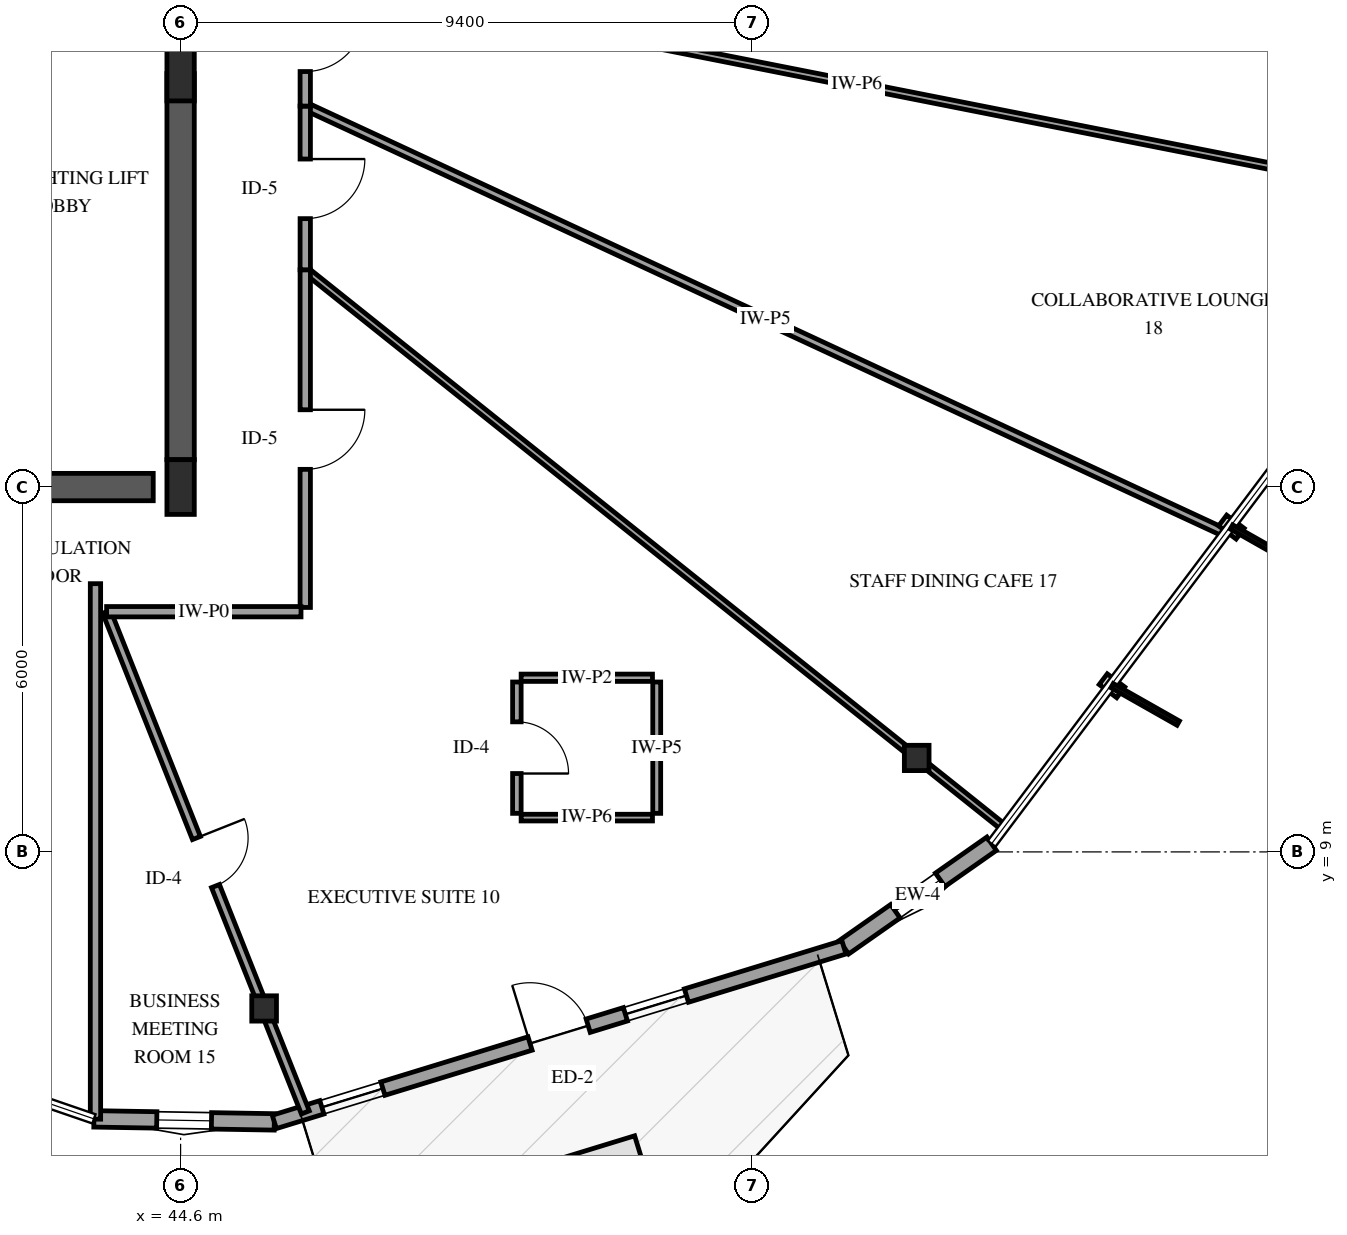
"""IFC4 building model, lengths in metres.
Left out: names, types, materials, properties, quantities, classifications, styles, units other than length and angle.
Written with IfcOpenShell. Run it as: python <this file> out.ifc"""

import sys

from ifc_helpers import new_model, si_unit, direction, frame, frame_2d, origin, origin_2d, place, context, subcontext, project, spatial, rectangle, i_section, extrude, element, fill, save


model = new_model("IFC4")
c1 = context("Model", 3, precision=1e-05, world=origin(), true_north=direction((0.0, 1.0)))
c2 = subcontext(c1, "Body", "Model", "MODEL_VIEW")
j1 = project(units=[si_unit("LENGTHUNIT", "METRE"), si_unit("PLANEANGLEUNIT", "RADIAN")], contexts=[c1])
p1 = place(None, origin())
s1 = spatial("IfcSite", under=j1, at=p1, CompositionType="ELEMENT")
p2 = place(p1, origin())
s2 = spatial("IfcBuilding", under=s1, at=p2, CompositionType="ELEMENT")
p3 = place(p2, frame((0.0, 0.0, 226.6)))
s3 = spatial("IfcBuildingStorey", under=s2, at=p3, CompositionType="ELEMENT", Elevation=226.6)
p4 = place(p3, frame((41.3, 15.0, 0.0), z_axis=(0.0, 0.0, 1.0), x_axis=(1.0, 0.0, 0.0)))
e1 = element("IfcWall", 1, at=p4, inside=s3, PredefinedType="SHEAR", context=c2, shape_type="SweptSolid", body=[
    extrude(rectangle(XDim=2.85, YDim=0.45, at=frame_2d((1.425, 0.0))), origin(), (0.0, 0.0, 1.0), 3.6),
])
p5 = place(p3, frame((44.6, 15.45, 0.0), z_axis=(0.0, 0.0, 1.0), x_axis=(0.0, 1.0, 0.0)))
e2 = element("IfcWall", 2, at=p5, inside=s3, PredefinedType="SHEAR", context=c2, shape_type="SweptSolid", body=[
    extrude(rectangle(XDim=6.35, YDim=0.45, at=frame_2d((3.175, 0.0))), origin(), (0.0, 0.0, 1.0), 3.6),
])
for number, where, z_axis, x_axis in (
    (3, (44.6, 15.0, 0.0), (0.0, 0.0, 1.0), (1.0, 0.0, 0.0)),
    (4, (44.6, 21.8, 0.0), (0.0, 0.0, 1.0), (1.0, 0.0, 0.0)),
):
    element("IfcColumn", number, at=place(p3, frame(where, z_axis=z_axis, x_axis=x_axis)), inside=s3, PredefinedType="PILASTER", context=c2, shape_type="SweptSolid", body=[
        extrude(rectangle(XDim=0.45, YDim=0.9, at=origin_2d()), origin(), (0.0, 0.0, 1.0), 3.6),
    ])
for number, where, z_axis, x_axis in (
    (5, (45.973, 6.426, 0.0), (0.0, 0.0, 1.0), (1.0, 0.0, 0.0)),
    (6, (56.705, 10.545, 0.0), (0.0, 0.0, 1.0), (1.0, 0.0, 0.0)),
):
    element("IfcColumn", number, at=place(p3, frame(where, z_axis=z_axis, x_axis=x_axis)), inside=s3, PredefinedType="COLUMN", context=c2, shape_type="SweptSolid", body=[
        extrude(i_section(OverallWidth=0.406, OverallDepth=0.416, WebThickness=0.03, FlangeThickness=0.048, FilletRadius=0.038, at=origin_2d()), origin(), (0.0, 0.0, 1.0), 3.6),
    ])
p6 = place(p3, frame((43.175, 4.61, 0.0), z_axis=(0.0, 0.0, 1.0), x_axis=(0.999860453609, -0.016705487414, 0.0)))
e7 = element("IfcWall", 7, at=p6, inside=s3, PredefinedType="SOLIDWALL", context=c2, shape_type="SweptSolid", body=[
    extrude(rectangle(XDim=2.967, YDim=0.27, at=frame_2d((1.483, 0.0))), origin(), (0.0, 0.0, 1.0), 2.679),
])
p7 = place(p6, frame((1.033, 0.0, 0.75)))
e8 = element("IfcOpeningElement", 8, at=p7, cuts=e7, PredefinedType="OPENING", context=c2, shape_type="SweptSolid", body=[
    extrude(rectangle(XDim=0.9, YDim=1.5, at=frame_2d((0.45, 0.75))), frame((0.0, 0.145, 0.0), z_axis=(0.0, -1.0, 0.0), x_axis=(1.0, 0.0, 0.0)), (0.0, 0.0, 1.0), 0.29),
])
p8 = place(p3, frame((55.509, 7.431, 0.0), z_axis=(0.0, 0.0, 1.0), x_axis=(0.818779304738, 0.574108395804, 0.0)))
e9 = element("IfcWall", 9, at=p8, inside=s3, PredefinedType="SOLIDWALL", context=c2, shape_type="SweptSolid", body=[
    extrude(rectangle(XDim=2.967, YDim=0.27, at=frame_2d((1.483, 0.0))), origin(), (0.0, 0.0, 1.0), 2.679),
])
p9 = place(p8, frame((1.033, 0.0, 0.75)))
e10 = element("IfcOpeningElement", 10, at=p9, cuts=e9, PredefinedType="OPENING", context=c2, shape_type="SweptSolid", body=[
    extrude(rectangle(XDim=0.9, YDim=1.5, at=frame_2d((0.45, 0.75))), frame((0.0, 0.145, 0.0), z_axis=(0.0, -1.0, 0.0), x_axis=(1.0, 0.0, 0.0)), (0.0, 0.0, 1.0), 0.29),
])
p10 = place(p3, frame((46.141, 4.56, 0.0), z_axis=(0.0, 0.0, 1.0), x_axis=(0.956099551419, 0.293042058033, 0.0)))
e11 = element("IfcWall", 11, at=p10, inside=s3, PredefinedType="SOLIDWALL", context=c2, shape_type="SweptSolid", body=[
    extrude(rectangle(XDim=9.798, YDim=0.23, at=frame_2d((4.899, 0.0))), origin(), (0.0, 0.0, 1.0), 2.679),
])
p11 = place(p10, frame((4.399, 0.0, 0.0)))
e12 = element("IfcOpeningElement", 12, at=p11, cuts=e11, PredefinedType="OPENING", context=c2, shape_type="SweptSolid", body=[
    extrude(rectangle(XDim=1.0, YDim=2.15, at=frame_2d((0.5, 1.075))), frame((0.0, 0.125, 0.0), z_axis=(0.0, -1.0, 0.0), x_axis=(1.0, 0.0, 0.0)), (0.0, 0.0, 1.0), 0.25),
])
p12 = place(p10, frame((0.818, 0.0, 0.72)))
e13 = element("IfcOpeningElement", 13, at=p12, cuts=e11, PredefinedType="OPENING", context=c2, shape_type="SweptSolid", body=[
    extrude(rectangle(XDim=1.05, YDim=1.55, at=frame_2d((0.525, 0.775))), frame((0.0, 0.125, 0.0), z_axis=(0.0, -1.0, 0.0), x_axis=(1.0, 0.0, 0.0)), (0.0, 0.0, 1.0), 0.25),
])
p13 = place(p10, frame((6.039, 0.0, 0.72)))
e14 = element("IfcOpeningElement", 14, at=p13, cuts=e11, PredefinedType="OPENING", context=c2, shape_type="SweptSolid", body=[
    extrude(rectangle(XDim=1.05, YDim=1.55, at=frame_2d((0.525, 0.775))), frame((0.0, 0.125, 0.0), z_axis=(0.0, -1.0, 0.0), x_axis=(1.0, 0.0, 0.0)), (0.0, 0.0, 1.0), 0.25),
])
p14 = place(p3, frame((46.65, 23.41, 0.0), z_axis=(0.0, 0.0, 1.0), x_axis=(0.981042007035, -0.193795202294, 0.0)))
e15 = element("IfcWall", 15, at=p14, inside=s3, PredefinedType="PARTITIONING", context=c2, shape_type="SweptSolid", body=[
    extrude(rectangle(XDim=18.494, YDim=0.11, at=frame_2d((9.247, 0.0))), origin(), (0.0, 0.0, 1.0), 2.595),
])
p15 = place(p3, frame((46.65, 21.265, 0.0), z_axis=(0.0, 0.0, 1.0), x_axis=(0.907114550352, -0.420883823091, 0.0)))
e16 = element("IfcWall", 16, at=p15, inside=s3, PredefinedType="PARTITIONING", context=c2, shape_type="SweptSolid", body=[
    extrude(rectangle(XDim=16.682, YDim=0.13, at=frame_2d((8.341, 0.0))), origin(), (0.0, 0.0, 1.0), 3.3),
])
p16 = place(p3, frame((46.65, 18.573, 0.0), z_axis=(0.0, 0.0, 1.0), x_axis=(0.781476039423, -0.623935252897, 0.0)))
e17 = element("IfcWall", 17, at=p16, inside=s3, PredefinedType="PARTITIONING", context=c2, shape_type="SweptSolid", body=[
    extrude(rectangle(XDim=14.7, YDim=0.11, at=frame_2d((7.35, 0.0))), origin(), (0.0, 0.0, 1.0), 3.3),
])
p17 = place(p3, frame((43.383, 12.95, 0.0), z_axis=(0.0, 0.0, 1.0), x_axis=(0.368885203629, -0.929474962838, 0.0)))
e18 = element("IfcWall", 18, at=p17, inside=s3, PredefinedType="PARTITIONING", context=c2, shape_type="SweptSolid", body=[
    extrude(rectangle(XDim=8.859, YDim=0.14, at=frame_2d((4.429, 0.0))), origin(), (0.0, 0.0, 1.0), 2.595),
])
p18 = place(p17, frame((4.004, 0.0, 0.0)))
e19 = element("IfcOpeningElement", 19, at=p18, cuts=e18, PredefinedType="OPENING", context=c2, shape_type="SweptSolid", body=[
    extrude(rectangle(XDim=0.85, YDim=2.1, at=frame_2d((0.425, 1.05))), frame((0.0, 0.08, 0.0), z_axis=(0.0, -1.0, 0.0), x_axis=(1.0, 0.0, 0.0)), (0.0, 0.0, 1.0), 0.16),
])
p19 = place(p3, frame((46.65, 18.573, 0.0), z_axis=(0.0, 0.0, 1.0), x_axis=(0.0, -1.0, 0.0)))
e20 = element("IfcWall", 20, at=p19, inside=s3, PredefinedType="PARTITIONING", context=c2, shape_type="SweptSolid", body=[
    extrude(rectangle(XDim=5.553, YDim=0.17, at=frame_2d((2.776, 0.0))), origin(), (0.0, 0.0, 1.0), 3.3),
])
p20 = place(p19, frame((2.302, 0.0, 0.0)))
e21 = element("IfcOpeningElement", 21, at=p20, cuts=e20, PredefinedType="OPENING", context=c2, shape_type="SweptSolid", body=[
    extrude(rectangle(XDim=0.98, YDim=2.15, at=frame_2d((0.49, 1.075))), frame((0.0, 0.095, 0.0), z_axis=(0.0, -1.0, 0.0), x_axis=(1.0, 0.0, 0.0)), (0.0, 0.0, 1.0), 0.19),
])
p21 = place(p3, frame((46.58, 12.95, 0.0), z_axis=(0.0, 0.0, 1.0), x_axis=(-1.0, 0.0, 0.0)))
e22 = element("IfcWall", 22, at=p21, inside=s3, PredefinedType="PARTITIONING", context=c2, shape_type="SweptSolid", body=[
    extrude(rectangle(XDim=3.197, YDim=0.17, at=frame_2d((1.599, 0.0))), origin(), (0.0, 0.0, 1.0), 3.3),
])
p22 = place(p3, frame((46.65, 21.265, 0.0), z_axis=(0.0, 0.0, 1.0), x_axis=(0.0, -1.0, 0.0)))
e23 = element("IfcWall", 23, at=p22, inside=s3, PredefinedType="PARTITIONING", context=c2, shape_type="SweptSolid", body=[
    extrude(rectangle(XDim=2.692, YDim=0.17, at=frame_2d((1.346, 0.0))), origin(), (0.0, 0.0, 1.0), 3.3),
])
p23 = place(p22, frame((0.871, 0.0, 0.0)))
e24 = element("IfcOpeningElement", 24, at=p23, cuts=e23, PredefinedType="OPENING", context=c2, shape_type="SweptSolid", body=[
    extrude(rectangle(XDim=0.98, YDim=2.15, at=frame_2d((0.49, 1.075))), frame((0.0, 0.095, 0.0), z_axis=(0.0, -1.0, 0.0), x_axis=(1.0, 0.0, 0.0)), (0.0, 0.0, 1.0), 0.19),
])
p24 = place(p3, frame((50.13, 11.794, 0.0), z_axis=(0.0, 0.0, 1.0), x_axis=(0.0, -1.0, 0.0)))
e25 = element("IfcWall", 25, at=p24, inside=s3, PredefinedType="PARTITIONING", context=c2, shape_type="SweptSolid", body=[
    extrude(rectangle(XDim=2.16, YDim=0.14, at=frame_2d((1.08, 0.0))), origin(), (0.0, 0.0, 1.0), 3.3),
])
p25 = place(p24, frame((0.655, 0.0, 0.0)))
e26 = element("IfcOpeningElement", 26, at=p25, cuts=e25, PredefinedType="OPENING", context=c2, shape_type="SweptSolid", body=[
    extrude(rectangle(XDim=0.85, YDim=2.1, at=frame_2d((0.425, 1.05))), frame((0.0, 0.08, 0.0), z_axis=(0.0, -1.0, 0.0), x_axis=(1.0, 0.0, 0.0)), (0.0, 0.0, 1.0), 0.16),
])
p26 = place(p3, frame((52.43, 9.634, 0.0), z_axis=(0.0, 0.0, 1.0), x_axis=(0.0, 1.0, 0.0)))
e27 = element("IfcWall", 27, at=p26, inside=s3, PredefinedType="PARTITIONING", context=c2, shape_type="SweptSolid", body=[
    extrude(rectangle(XDim=2.16, YDim=0.13, at=frame_2d((1.08, 0.0))), origin(), (0.0, 0.0, 1.0), 3.3),
])
p27 = place(p3, frame((52.36, 11.864, 0.0), z_axis=(0.0, 0.0, 1.0), x_axis=(-1.0, 0.0, 0.0)))
e28 = element("IfcWall", 28, at=p27, inside=s3, PredefinedType="PARTITIONING", context=c2, shape_type="SweptSolid", body=[
    extrude(rectangle(XDim=2.16, YDim=0.12, at=frame_2d((1.08, 0.0))), origin(), (0.0, 0.0, 1.0), 3.3),
])
p28 = place(p3, frame((50.2, 9.564, 0.0), z_axis=(0.0, 0.0, 1.0), x_axis=(1.0, 0.0, 0.0)))
e29 = element("IfcWall", 29, at=p28, inside=s3, PredefinedType="PARTITIONING", context=c2, shape_type="SweptSolid", body=[
    extrude(rectangle(XDim=2.16, YDim=0.11, at=frame_2d((1.08, 0.0))), origin(), (0.0, 0.0, 1.0), 3.3),
])
p29 = place(p3, frame((46.65, 23.41, 0.0), z_axis=(0.0, 0.0, 1.0), x_axis=(0.0, -1.0, 0.0)))
e30 = element("IfcWall", 30, at=p29, inside=s3, PredefinedType="PARTITIONING", context=c2, shape_type="SweptSolid", body=[
    extrude(rectangle(XDim=2.145, YDim=0.17, at=frame_2d((1.073, 0.0))), origin(), (0.0, 0.0, 1.0), 3.3),
])
p30 = place(p29, frame((0.597, 0.0, 0.0)))
e31 = element("IfcOpeningElement", 31, at=p30, cuts=e30, PredefinedType="OPENING", context=c2, shape_type="SweptSolid", body=[
    extrude(rectangle(XDim=0.98, YDim=2.15, at=frame_2d((0.49, 1.075))), frame((0.0, 0.095, 0.0), z_axis=(0.0, -1.0, 0.0), x_axis=(1.0, 0.0, 0.0)), (0.0, 0.0, 1.0), 0.19),
])
p31 = place(p3, frame((43.2, 13.411, 0.0), z_axis=(0.0, 0.0, 1.0), x_axis=(0.0, -1.0, 0.0)))
e32 = element("IfcWall", 32, at=p31, inside=s3, PredefinedType="PARTITIONING", context=c2, shape_type="SweptSolid", body=[
    extrude(rectangle(XDim=8.806, YDim=0.17, at=frame_2d((4.403, 0.0))), origin(), (0.0, 0.0, 1.0), 2.678),
])
p32 = place(p7, origin())
e33 = element("IfcWindow", 33, at=p32, inside=s3, PartitioningType="SINGLE_PANEL", PredefinedType="WINDOW", context=c2, shape_type="SweptSolid", body=[
    extrude(rectangle(XDim=0.9, YDim=1.5, at=frame_2d((0.45, 0.75))), frame((0.0, 0.03, 0.0), z_axis=(0.0, -1.0, 0.0), x_axis=(1.0, 0.0, 0.0)), (0.0, 0.0, 1.0), 0.06),
])
fill(e8, e33)
p33 = place(p9, origin())
e34 = element("IfcWindow", 34, at=p33, inside=s3, PartitioningType="SINGLE_PANEL", PredefinedType="WINDOW", context=c2, shape_type="SweptSolid", body=[
    extrude(rectangle(XDim=0.9, YDim=1.5, at=frame_2d((0.45, 0.75))), frame((0.0, 0.03, 0.0), z_axis=(0.0, -1.0, 0.0), x_axis=(1.0, 0.0, 0.0)), (0.0, 0.0, 1.0), 0.06),
])
fill(e10, e34)
p34 = place(p11, origin())
e35 = element("IfcDoor", 35, at=p34, inside=s3, OperationType="SINGLE_SWING_LEFT", PredefinedType="DOOR", context=c2, shape_type="SweptSolid", body=[
    extrude(rectangle(XDim=1.0, YDim=2.15, at=frame_2d((0.5, 1.075))), frame((0.0, 0.025, 0.0), z_axis=(0.0, -1.0, 0.0), x_axis=(1.0, 0.0, 0.0)), (0.0, 0.0, 1.0), 0.05),
])
fill(e12, e35)
p35 = place(p12, origin())
e36 = element("IfcWindow", 36, at=p35, inside=s3, PartitioningType="SINGLE_PANEL", PredefinedType="WINDOW", context=c2, shape_type="SweptSolid", body=[
    extrude(rectangle(XDim=1.05, YDim=1.55, at=frame_2d((0.525, 0.775))), frame((0.0, 0.03, 0.0), z_axis=(0.0, -1.0, 0.0), x_axis=(1.0, 0.0, 0.0)), (0.0, 0.0, 1.0), 0.06),
])
fill(e13, e36)
p36 = place(p13, origin())
e37 = element("IfcWindow", 37, at=p36, inside=s3, PartitioningType="SINGLE_PANEL", PredefinedType="WINDOW", context=c2, shape_type="SweptSolid", body=[
    extrude(rectangle(XDim=1.05, YDim=1.55, at=frame_2d((0.525, 0.775))), frame((0.0, 0.03, 0.0), z_axis=(0.0, -1.0, 0.0), x_axis=(1.0, 0.0, 0.0)), (0.0, 0.0, 1.0), 0.06),
])
fill(e14, e37)
p37 = place(p18, origin())
e38 = element("IfcDoor", 38, at=p37, inside=s3, OperationType="SINGLE_SWING_LEFT", PredefinedType="DOOR", context=c2, shape_type="SweptSolid", body=[
    extrude(rectangle(XDim=0.85, YDim=2.1, at=frame_2d((0.425, 1.05))), frame((0.0, 0.025, 0.0), z_axis=(0.0, -1.0, 0.0), x_axis=(1.0, 0.0, 0.0)), (0.0, 0.0, 1.0), 0.05),
])
fill(e19, e38)
p38 = place(p20, origin())
e39 = element("IfcDoor", 39, at=p38, inside=s3, OperationType="SINGLE_SWING_LEFT", PredefinedType="DOOR", context=c2, shape_type="SweptSolid", body=[
    extrude(rectangle(XDim=0.98, YDim=2.15, at=frame_2d((0.49, 1.075))), frame((0.0, 0.025, 0.0), z_axis=(0.0, -1.0, 0.0), x_axis=(1.0, 0.0, 0.0)), (0.0, 0.0, 1.0), 0.05),
])
fill(e21, e39)
p39 = place(p23, origin())
e40 = element("IfcDoor", 40, at=p39, inside=s3, OperationType="SINGLE_SWING_LEFT", PredefinedType="DOOR", context=c2, shape_type="SweptSolid", body=[
    extrude(rectangle(XDim=0.98, YDim=2.15, at=frame_2d((0.49, 1.075))), frame((0.0, 0.025, 0.0), z_axis=(0.0, -1.0, 0.0), x_axis=(1.0, 0.0, 0.0)), (0.0, 0.0, 1.0), 0.05),
])
fill(e24, e40)
p40 = place(p25, origin())
e41 = element("IfcDoor", 41, at=p40, inside=s3, OperationType="SINGLE_SWING_RIGHT", PredefinedType="DOOR", context=c2, shape_type="SweptSolid", body=[
    extrude(rectangle(XDim=0.85, YDim=2.1, at=frame_2d((0.425, 1.05))), frame((0.0, 0.025, 0.0), z_axis=(0.0, -1.0, 0.0), x_axis=(1.0, 0.0, 0.0)), (0.0, 0.0, 1.0), 0.05),
])
fill(e26, e41)
p41 = place(p30, origin())
e42 = element("IfcDoor", 42, at=p41, inside=s3, OperationType="SINGLE_SWING_LEFT", PredefinedType="DOOR", context=c2, shape_type="SweptSolid", body=[
    extrude(rectangle(XDim=0.98, YDim=2.15, at=frame_2d((0.49, 1.075))), frame((0.0, 0.025, 0.0), z_axis=(0.0, -1.0, 0.0), x_axis=(1.0, 0.0, 0.0)), (0.0, 0.0, 1.0), 0.05),
])
fill(e31, e42)
save(model, sys.argv[1])
